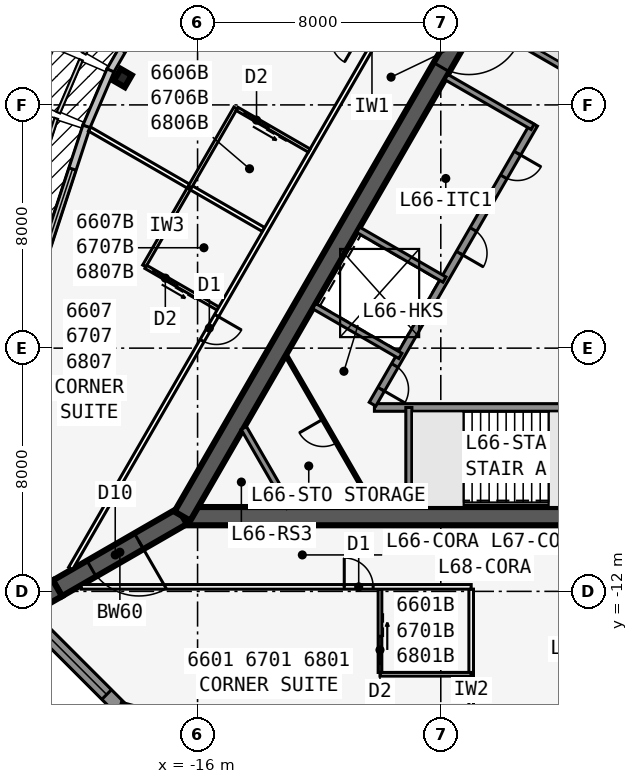
"""IFC4 building model, lengths in metres.
Left out: names, types, materials, properties, quantities, classifications, styles, units other than length and angle.
Written with IfcOpenShell. Run it as: python <this file> out.ifc"""

import sys

from ifc_helpers import new_model, si_unit, direction, frame, frame_2d, origin, origin_2d, place, context, subcontext, project, spatial, polyline, rectangle, i_section, outline, extrude, element, fill, save


model = new_model("IFC4")
c1 = context("Model", 3, precision=1e-05, world=origin(), true_north=direction((0.0, 1.0)))
c2 = subcontext(c1, "Body", "Model", "MODEL_VIEW")
j1 = project(units=[si_unit("LENGTHUNIT", "METRE"), si_unit("PLANEANGLEUNIT", "RADIAN")], contexts=[c1])
p1 = place(None, origin())
s1 = spatial("IfcSite", under=j1, at=p1, CompositionType="ELEMENT")
p2 = place(p1, origin())
s2 = spatial("IfcBuilding", under=s1, at=p2, CompositionType="ELEMENT")
p3 = place(p2, frame((0.0, 0.0, 250.1)))
s3 = spatial("IfcBuildingStorey", under=s2, at=p3, CompositionType="ELEMENT", Elevation=250.1)
p4 = place(p3, frame((-16.5, -9.526, 0.0), z_axis=(0.0, 0.0, 1.0), x_axis=(1.0, 0.0, 0.0)))
e1 = element("IfcWall", 1, at=p4, inside=s3, PredefinedType="SHEAR", context=c2, shape_type="SweptSolid", body=[
    extrude(rectangle(XDim=33.0, YDim=0.6, at=frame_2d((16.5, 0.0))), origin(), (0.0, 0.0, 1.0), 3.6),
])
p5 = place(p4, frame((14.05, 0.0, 0.0)))
e2 = element("IfcOpeningElement", 2, at=p5, cuts=e1, PredefinedType="OPENING", context=c2, shape_type="SweptSolid", body=[
    extrude(rectangle(XDim=1.8, YDim=2.13, at=frame_2d((0.9, 1.065))), frame((0.0, 0.31, 0.0), z_axis=(0.0, -1.0, 0.0), x_axis=(1.0, 0.0, 0.0)), (0.0, 0.0, 1.0), 0.62),
])
p6 = place(p3, frame((-10.183, -5.951, 0.0), z_axis=(0.0, 0.0, 1.0), x_axis=(1.0, 0.0, 0.0)))
e3 = element("IfcWall", 3, at=p6, inside=s3, PredefinedType="SOLIDWALL", context=c2, shape_type="SweptSolid", body=[
    extrude(rectangle(XDim=7.633, YDim=0.25, at=frame_2d((3.816, 0.0))), origin(), (0.0, 0.0, 1.0), 3.435),
])
p7 = place(p3, frame((-9.05, -5.951, 0.0), z_axis=(0.0, 0.0, 1.0), x_axis=(0.0, -1.0, 0.0)))
e4 = element("IfcWall", 4, at=p7, inside=s3, PredefinedType="SOLIDWALL", context=c2, shape_type="SweptSolid", body=[
    extrude(rectangle(XDim=3.275, YDim=0.2, at=frame_2d((1.637, 0.0))), origin(), (0.0, 0.0, 1.0), 3.435),
])
p8 = place(p3, frame((0.0, 19.052, 0.0), z_axis=(0.0, 0.0, 1.0), x_axis=(-0.499999749417, -0.866025548458, 0.0)))
e5 = element("IfcWall", 5, at=p8, inside=s3, PredefinedType="SHEAR", context=c2, shape_type="SweptSolid", body=[
    extrude(rectangle(XDim=33.0, YDim=0.6, at=frame_2d((16.5, 0.0))), origin(), (0.0, 0.0, 1.0), 3.6),
])
p9 = place(p8, frame((14.15, 0.0, 0.0)))
e6 = element("IfcOpeningElement", 6, at=p9, cuts=e5, PredefinedType="OPENING", context=c2, shape_type="SweptSolid", body=[
    extrude(rectangle(XDim=1.8, YDim=2.13, at=frame_2d((0.9, 1.065))), frame((0.0, 0.31, 0.0), z_axis=(0.0, -1.0, 0.0), x_axis=(1.0, 0.0, 0.0)), (0.0, 0.0, 1.0), 0.62),
])
p10 = place(p8, frame((12.6, 0.0, 0.0)))
e7 = element("IfcOpeningElement", 7, at=p10, cuts=e5, PredefinedType="OPENING", context=c2, shape_type="SweptSolid", body=[
    extrude(rectangle(XDim=1.0, YDim=2.13, at=frame_2d((0.5, 1.065))), frame((0.0, 0.31, 0.0), z_axis=(0.0, -1.0, 0.0), x_axis=(1.0, 0.0, 0.0)), (0.0, 0.0, 1.0), 0.62),
])
p11 = place(p3, frame((-4.929, 3.365, 0.0), z_axis=(0.0, 0.0, 1.0), x_axis=(-0.499991433582, -0.866030349552, 0.0)))
e8 = element("IfcWall", 8, at=p11, inside=s3, PredefinedType="SOLIDWALL", context=c2, shape_type="SweptSolid", body=[
    extrude(rectangle(XDim=10.633, YDim=0.25, at=frame_2d((5.316, 0.0))), origin(), (0.0, 0.0, 1.0), 3.435),
])
p12 = place(p11, frame((9.164, 0.0, 0.0)))
e9 = element("IfcOpeningElement", 9, at=p12, cuts=e8, PredefinedType="OPENING", context=c2, shape_type="SweptSolid", body=[
    extrude(rectangle(XDim=0.9, YDim=2.13, at=frame_2d((0.45, 1.065))), frame((0.0, 0.135, 0.0), z_axis=(0.0, -1.0, 0.0), x_axis=(1.0, 0.0, 0.0)), (0.0, 0.0, 1.0), 0.27),
])
p13 = place(p11, frame((1.1, 0.0, 0.0)))
e10 = element("IfcOpeningElement", 10, at=p13, cuts=e8, PredefinedType="OPENING", context=c2, shape_type="SweptSolid", body=[
    extrude(rectangle(XDim=0.9, YDim=2.13, at=frame_2d((0.45, 1.065))), frame((0.0, 0.135, 0.0), z_axis=(0.0, -1.0, 0.0), x_axis=(1.0, 0.0, 0.0)), (0.0, 0.0, 1.0), 0.27),
])
p14 = place(p11, frame((4.0, 0.0, 0.0)))
e11 = element("IfcOpeningElement", 11, at=p14, cuts=e8, PredefinedType="OPENING", context=c2, shape_type="SweptSolid", body=[
    extrude(rectangle(XDim=0.9, YDim=2.13, at=frame_2d((0.45, 1.065))), frame((0.0, 0.135, 0.0), z_axis=(0.0, -1.0, 0.0), x_axis=(1.0, 0.0, 0.0)), (0.0, 0.0, 1.0), 0.27),
])
for number, where, z_axis, x_axis in (
    (12, (-3.879, 5.184, 0.0), (0.0, 0.0, 1.0), (-0.866, 0.5, 0.0)),
    (13, (-4.979, 3.279, 0.0), (0.0, 0.0, 1.0), (-0.866, 0.5, 0.0)),
    (14, (-7.879, -1.744, 0.0), (0.0, 0.0, 1.0), (-0.866, 0.5, 0.0)),
    (15, (-9.329, -4.256, 0.0), (0.0, 0.0, 1.0), (-0.866, 0.5, 0.0)),
):
    element("IfcWall", number, at=place(p3, frame(where, z_axis=z_axis, x_axis=x_axis)), inside=s3, PredefinedType="SOLIDWALL", context=c2, shape_type="SweptSolid", body=[
        extrude(rectangle(XDim=3.275, YDim=0.2, at=frame_2d((1.637, 0.0))), origin(), (0.0, 0.0, 1.0), 3.435),
    ])
p15 = place(p3, frame((-16.5, -9.526, 0.0), z_axis=(0.0, 0.0, 1.0), x_axis=(-0.866031398331, -0.499989616998, 0.0)))
e16 = element("IfcWall", 16, at=p15, inside=s3, PredefinedType="SHEAR", context=c2, shape_type="SweptSolid", body=[
    extrude(rectangle(XDim=4.746, YDim=0.6, at=frame_2d((2.373, 0.0))), origin(), (0.0, 0.0, 1.0), 3.6),
])
p16 = place(p15, frame((1.65, 0.0, 0.0)))
e17 = element("IfcOpeningElement", 17, at=p16, cuts=e16, PredefinedType="OPENING", context=c2, shape_type="SweptSolid", body=[
    extrude(rectangle(XDim=1.8, YDim=2.13, at=frame_2d((0.9, 1.065))), frame((0.0, 0.31, 0.0), z_axis=(0.0, -1.0, 0.0), x_axis=(1.0, 0.0, 0.0)), (0.0, 0.0, 1.0), 0.62),
])
p17 = place(p3, frame((-20.61, -11.899, 0.0), z_axis=(0.0, 0.0, 1.0), x_axis=(-0.866009537788, -0.500027479704, 0.0)))
e18 = element("IfcWall", 18, at=p17, inside=s3, PredefinedType="SHEAR", context=c2, shape_type="SweptSolid", body=[
    extrude(rectangle(XDim=1.155, YDim=0.6, at=frame_2d((0.577, 0.0))), origin(), (0.0, 0.0, 1.0), 3.6),
])
p18 = place(p3, frame((-18.461, 4.885, 0.0), z_axis=(0.0, 0.0, 1.0), x_axis=(-0.866025403784, 0.5, 0.0)))
e19 = element("IfcColumn", 19, at=p18, inside=s3, PredefinedType="COLUMN", context=c2, shape_type="SweptSolid", body=[
    extrude(i_section(OverallWidth=0.419, OverallDepth=0.455, WebThickness=0.042, FlangeThickness=0.068, at=origin_2d()), origin(), (0.0, 0.0, 1.0), 3.6),
])
p19 = place(p3, frame((-13.873, 13.783, 0.0), z_axis=(0.0, 0.0, 1.0), x_axis=(-0.499993662806, -0.866029062534, 0.0)))
e20 = element("IfcWall", 20, at=p19, inside=s3, PredefinedType="STANDARD", context=c2, shape_type="SweptSolid", body=[
    extrude(rectangle(XDim=10.0, YDim=0.25, at=frame_2d((5.0, 0.0))), origin(), (0.0, 0.0, 1.0), 3.435),
])
p20 = place(p19, frame((0.775, 0.0, 0.45)))
e21 = element("IfcOpeningElement", 21, at=p20, cuts=e20, PredefinedType="OPENING", context=c2, shape_type="SweptSolid", body=[
    extrude(rectangle(XDim=3.6, YDim=2.6, at=frame_2d((1.8, 1.3))), frame((0.0, 0.135, 0.0), z_axis=(0.0, -1.0, 0.0), x_axis=(1.0, 0.0, 0.0)), (0.0, 0.0, 1.0), 0.27),
])
p21 = place(p19, frame((5.625, 0.0, 0.45)))
e22 = element("IfcOpeningElement", 22, at=p21, cuts=e20, PredefinedType="OPENING", context=c2, shape_type="SweptSolid", body=[
    extrude(rectangle(XDim=3.6, YDim=2.6, at=frame_2d((1.8, 1.3))), frame((0.0, 0.135, 0.0), z_axis=(0.0, -1.0, 0.0), x_axis=(1.0, 0.0, 0.0)), (0.0, 0.0, 1.0), 0.27),
])
p22 = place(p3, frame((-18.866, 5.136, 0.0), z_axis=(0.0, 0.0, 1.0), x_axis=(-0.393290226175, -0.91941437774, 0.0)))
e23 = element("IfcWall", 23, at=p22, inside=s3, PredefinedType="STANDARD", context=c2, shape_type="SweptSolid", body=[
    extrude(rectangle(XDim=2.014, YDim=0.25, at=frame_2d((1.007, 0.0))), origin(), (0.0, 0.0, 1.0), 3.435),
])
p23 = place(p3, frame((-19.654, 3.294, 0.0), z_axis=(0.0, 0.0, 1.0), x_axis=(-0.311328857048, -0.95030223759, 0.0)))
e24 = element("IfcWall", 24, at=p23, inside=s3, PredefinedType="STANDARD", context=c2, shape_type="SweptSolid", body=[
    extrude(rectangle(XDim=7.153, YDim=0.25, at=frame_2d((3.576, 0.0))), origin(), (0.0, 0.0, 1.0), 3.435),
])
p24 = place(p23, frame((1.476, 0.0, 0.45)))
e25 = element("IfcOpeningElement", 25, at=p24, cuts=e24, PredefinedType="OPENING", context=c2, shape_type="SweptSolid", body=[
    extrude(rectangle(XDim=4.2, YDim=2.6, at=frame_2d((2.1, 1.3))), frame((0.0, 0.135, 0.0), z_axis=(0.0, -1.0, 0.0), x_axis=(1.0, 0.0, 0.0)), (0.0, 0.0, 1.0), 0.27),
])
p25 = place(p3, frame((-21.841, -12.542, 0.0), z_axis=(0.0, 0.0, 1.0), x_axis=(0.707081252484, -0.707132308968, 0.0)))
e26 = element("IfcWall", 26, at=p25, inside=s3, PredefinedType="SOLIDWALL", context=c2, shape_type="SweptSolid", body=[
    extrude(outline(polyline([(4.782, 0.225), (0.431, 0.225), (0.406, 0.132), (0.059, 0.225), (0.0, 0.225), (0.0, -0.225), (4.782, -0.225), (4.782, 0.225)])), origin(), (0.0, 0.0, 1.0), 3.435),
])
p26 = place(p25, frame((1.031, 0.0, 0.45)))
e27 = element("IfcOpeningElement", 27, at=p26, cuts=e26, PredefinedType="OPENING", context=c2, shape_type="SweptSolid", body=[
    extrude(rectangle(XDim=3.0, YDim=2.6, at=frame_2d((1.5, 1.3))), frame((0.0, 0.235, 0.0), z_axis=(0.0, -1.0, 0.0), x_axis=(1.0, 0.0, 0.0)), (0.0, 0.0, 1.0), 0.47),
])
p27 = place(p3, frame((-18.561, -15.865, 0.0), z_axis=(0.0, 0.0, 1.0), x_axis=(0.965913862671, -0.258863689806, 0.0)))
e28 = element("IfcWall", 28, at=p27, inside=s3, PredefinedType="SOLIDWALL", context=c2, shape_type="SweptSolid", body=[
    extrude(rectangle(XDim=4.782, YDim=0.45, at=frame_2d((2.391, 0.0))), origin(), (0.0, 0.0, 1.0), 3.435),
])
p28 = place(p27, frame((0.591, 0.0, 0.45)))
e29 = element("IfcOpeningElement", 29, at=p28, cuts=e28, PredefinedType="OPENING", context=c2, shape_type="SweptSolid", body=[
    extrude(rectangle(XDim=3.6, YDim=2.6, at=frame_2d((1.8, 1.3))), frame((0.0, 0.235, 0.0), z_axis=(0.0, -1.0, 0.0), x_axis=(1.0, 0.0, 0.0)), (0.0, 0.0, 1.0), 0.47),
])
p29 = place(p3, frame((-19.827, -11.851, 0.0), z_axis=(0.0, 0.0, 1.0), x_axis=(1.0, 0.0, 0.0)))
e30 = element("IfcWall", 30, at=p29, inside=s3, PredefinedType="PARTITIONING", context=c2, shape_type="SweptSolid", body=[
    extrude(rectangle(XDim=12.827, YDim=0.15, at=frame_2d((6.414, 0.0))), origin(), (0.0, 0.0, 1.0), 3.435),
])
p30 = place(p29, frame((8.652, 0.0, 0.0)))
e31 = element("IfcOpeningElement", 31, at=p30, cuts=e30, PredefinedType="OPENING", context=c2, shape_type="SweptSolid", body=[
    extrude(rectangle(XDim=0.95, YDim=2.13, at=frame_2d((0.475, 1.065))), frame((0.0, 0.085, 0.0), z_axis=(0.0, -1.0, 0.0), x_axis=(1.0, 0.0, 0.0)), (0.0, 0.0, 1.0), 0.17),
])
p31 = place(p3, frame((-7.0, -11.926, 0.0), z_axis=(0.0, 0.0, 1.0), x_axis=(0.0, -1.0, 0.0)))
e32 = element("IfcWall", 32, at=p31, inside=s3, PredefinedType="PARTITIONING", context=c2, shape_type="SweptSolid", body=[
    extrude(rectangle(XDim=6.609, YDim=0.15, at=frame_2d((3.304, 0.0))), origin(), (0.0, 0.0, 1.0), 2.678),
])
p32 = place(p3, frame((-10.0, -14.726, 0.0), z_axis=(0.0, 0.0, 1.0), x_axis=(1.0, 0.0, 0.0)))
e33 = element("IfcWall", 33, at=p32, inside=s3, PredefinedType="PLUMBINGWALL", context=c2, shape_type="SweptSolid", body=[
    extrude(rectangle(XDim=3.0, YDim=0.12, at=frame_2d((1.5, 0.0))), origin(), (0.0, 0.0, 1.0), 3.435),
])
p33 = place(p3, frame((-10.0, -11.926, 0.0), z_axis=(0.0, 0.0, 1.0), x_axis=(0.0, -1.0, 0.0)))
e34 = element("IfcWall", 34, at=p33, inside=s3, PredefinedType="PLUMBINGWALL", context=c2, shape_type="SweptSolid", body=[
    extrude(rectangle(XDim=2.74, YDim=0.12, at=frame_2d((1.37, 0.0))), origin(), (0.0, 0.0, 1.0), 3.435),
])
p34 = place(p33, frame((1.55, 0.0, 0.0)))
e35 = element("IfcOpeningElement", 35, at=p34, cuts=e34, PredefinedType="OPENING", context=c2, shape_type="SweptSolid", body=[
    extrude(rectangle(XDim=0.9, YDim=2.13, at=frame_2d((0.45, 1.065))), frame((0.0, 0.07, 0.0), z_axis=(0.0, -1.0, 0.0), x_axis=(1.0, 0.0, 0.0)), (0.0, 0.0, 1.0), 0.14),
])
p35 = place(p3, frame((-0.35, 23.096, 0.0), z_axis=(0.0, 0.0, 1.0), x_axis=(-0.499998875317, -0.866026053119, 0.0)))
e36 = element("IfcWall", 36, at=p35, inside=s3, PredefinedType="PARTITIONING", context=c2, shape_type="SweptSolid", body=[
    extrude(rectangle(XDim=39.654, YDim=0.15, at=frame_2d((19.827, 0.0))), origin(), (0.0, 0.0, 1.0), 3.435),
])
p36 = place(p35, frame((8.652, 0.0, 0.0)))
e37 = element("IfcOpeningElement", 37, at=p36, cuts=e36, PredefinedType="OPENING", context=c2, shape_type="SweptSolid", body=[
    extrude(rectangle(XDim=0.95, YDim=2.13, at=frame_2d((0.475, 1.065))), frame((0.0, 0.085, 0.0), z_axis=(0.0, -1.0, 0.0), x_axis=(1.0, 0.0, 0.0)), (0.0, 0.0, 1.0), 0.17),
])
p37 = place(p35, frame((15.852, 0.0, 0.0)))
e38 = element("IfcOpeningElement", 38, at=p37, cuts=e36, PredefinedType="OPENING", context=c2, shape_type="SweptSolid", body=[
    extrude(rectangle(XDim=0.95, YDim=2.13, at=frame_2d((0.475, 1.065))), frame((0.0, 0.085, 0.0), z_axis=(0.0, -1.0, 0.0), x_axis=(1.0, 0.0, 0.0)), (0.0, 0.0, 1.0), 0.17),
])
p38 = place(p35, frame((30.052, 0.0, 0.0)))
e39 = element("IfcOpeningElement", 39, at=p38, cuts=e36, PredefinedType="OPENING", context=c2, shape_type="SweptSolid", body=[
    extrude(rectangle(XDim=0.95, YDim=2.13, at=frame_2d((0.475, 1.065))), frame((0.0, 0.085, 0.0), z_axis=(0.0, -1.0, 0.0), x_axis=(1.0, 0.0, 0.0)), (0.0, 0.0, 1.0), 0.17),
])
p39 = place(p3, frame((-13.829, -0.099, 0.0), z_axis=(0.0, 0.0, 1.0), x_axis=(-0.866022562216, 0.500004921708, 0.0)))
e40 = element("IfcWall", 40, at=p39, inside=s3, PredefinedType="PARTITIONING", context=c2, shape_type="SweptSolid", body=[
    extrude(rectangle(XDim=6.609, YDim=0.15, at=frame_2d((3.304, 0.0))), origin(), (0.0, 0.0, 1.0), 2.678),
])
p40 = place(p3, frame((-14.753, 3.899, 0.0), z_axis=(0.0, 0.0, 1.0), x_axis=(-0.50002537861, -0.866010750942, 0.0)))
e41 = element("IfcWall", 41, at=p40, inside=s3, PredefinedType="PLUMBINGWALL", context=c2, shape_type="SweptSolid", body=[
    extrude(rectangle(XDim=3.0, YDim=0.12, at=frame_2d((1.5, 0.0))), origin(), (0.0, 0.0, 1.0), 3.435),
])
p41 = place(p3, frame((-12.329, 2.499, 0.0), z_axis=(0.0, 0.0, 1.0), x_axis=(-0.866035715982, 0.499982138324, 0.0)))
e42 = element("IfcWall", 42, at=p41, inside=s3, PredefinedType="PLUMBINGWALL", context=c2, shape_type="SweptSolid", body=[
    extrude(rectangle(XDim=2.74, YDim=0.12, at=frame_2d((1.37, 0.0))), origin(), (0.0, 0.0, 1.0), 3.435),
])
p42 = place(p41, frame((1.55, 0.0, 0.0)))
e43 = element("IfcOpeningElement", 43, at=p42, cuts=e42, PredefinedType="OPENING", context=c2, shape_type="SweptSolid", body=[
    extrude(rectangle(XDim=0.9, YDim=2.13, at=frame_2d((0.45, 1.065))), frame((0.0, 0.07, 0.0), z_axis=(0.0, -1.0, 0.0), x_axis=(1.0, 0.0, 0.0)), (0.0, 0.0, 1.0), 0.14),
])
p43 = place(p3, frame((-16.253, 1.301, 0.0), z_axis=(0.0, 0.0, 1.0), x_axis=(-0.499990139034, -0.866031096941, 0.0)))
e44 = element("IfcWall", 44, at=p43, inside=s3, PredefinedType="PLUMBINGWALL", context=c2, shape_type="SweptSolid", body=[
    extrude(rectangle(XDim=3.0, YDim=0.12, at=frame_2d((1.5, 0.0))), origin(), (0.0, 0.0, 1.0), 3.435),
])
p44 = place(p3, frame((-15.329, -2.697, 0.0), z_axis=(0.0, 0.0, 1.0), x_axis=(-0.866035715982, 0.499982138324, 0.0)))
e45 = element("IfcWall", 45, at=p44, inside=s3, PredefinedType="PLUMBINGWALL", context=c2, shape_type="SweptSolid", body=[
    extrude(rectangle(XDim=2.74, YDim=0.12, at=frame_2d((1.37, 0.0))), origin(), (0.0, 0.0, 1.0), 3.435),
])
p45 = place(p44, frame((1.55, 0.0, 0.0)))
e46 = element("IfcOpeningElement", 46, at=p45, cuts=e45, PredefinedType="OPENING", context=c2, shape_type="SweptSolid", body=[
    extrude(rectangle(XDim=0.9, YDim=2.13, at=frame_2d((0.45, 1.065))), frame((0.0, 0.07, 0.0), z_axis=(0.0, -1.0, 0.0), x_axis=(1.0, 0.0, 0.0)), (0.0, 0.0, 1.0), 0.14),
])
p46 = place(p3, frame((-12.978, -9.226, 0.0), z_axis=(0.0, 0.0, 1.0), x_axis=(-0.499952404951, 0.866052881055, 0.0)))
e47 = element("IfcWall", 47, at=p46, inside=s3, PredefinedType="SOLIDWALL", context=c2, shape_type="SweptSolid", body=[
    extrude(rectangle(XDim=3.002, YDim=0.2, at=frame_2d((1.501, 0.0))), origin(), (0.0, 0.0, 1.0), 3.435),
])
p47 = place(p3, frame((-10.207, -9.226, 0.0), z_axis=(0.0, 0.0, 1.0), x_axis=(-0.500027479704, 0.866009537788, 0.0)))
e48 = element("IfcWall", 48, at=p47, inside=s3, PredefinedType="PARTITIONING", context=c2, shape_type="SweptSolid", body=[
    extrude(rectangle(XDim=5.774, YDim=0.1, at=frame_2d((2.887, 0.0))), origin(), (0.0, 0.0, 1.0), 3.435),
])
p48 = place(p47, frame((2.437, 0.0, 0.0)))
e49 = element("IfcOpeningElement", 49, at=p48, cuts=e48, PredefinedType="OPENING", context=c2, shape_type="SweptSolid", body=[
    extrude(rectangle(XDim=0.9, YDim=2.13, at=frame_2d((0.45, 1.065))), frame((0.0, 0.06, 0.0), z_axis=(0.0, -1.0, 0.0), x_axis=(1.0, 0.0, 0.0)), (0.0, 0.0, 1.0), 0.12),
])
p49 = place(p3, frame((-7.247, -7.576, 0.0), z_axis=(0.0, 0.0, 1.0), x_axis=(1.0, 0.0, 0.0)))
e50 = element("IfcWall", 50, at=p49, inside=s3, PredefinedType="SOLIDWALL", context=c2, shape_type="SweptSolid", body=[
    extrude(rectangle(XDim=2.794, YDim=0.1, at=frame_2d((1.397, 0.0))), origin(), (0.0, 0.0, 1.0), 3.6),
])
p50 = place(p24, origin())
e51 = element("IfcWindow", 51, at=p50, inside=s3, PartitioningType="SINGLE_PANEL", PredefinedType="WINDOW", context=c2, shape_type="SweptSolid", body=[
    extrude(rectangle(XDim=4.2, YDim=2.6, at=frame_2d((2.1, 1.3))), frame((0.0, 0.03, 0.0), z_axis=(0.0, -1.0, 0.0), x_axis=(1.0, 0.0, 0.0)), (0.0, 0.0, 1.0), 0.06),
])
fill(e25, e51)
p51 = place(p26, origin())
e52 = element("IfcWindow", 52, at=p51, inside=s3, PartitioningType="SINGLE_PANEL", PredefinedType="WINDOW", context=c2, shape_type="SweptSolid", body=[
    extrude(rectangle(XDim=3.0, YDim=2.6, at=frame_2d((1.5, 1.3))), frame((0.0, 0.03, 0.0), z_axis=(0.0, -1.0, 0.0), x_axis=(1.0, 0.0, 0.0)), (0.0, 0.0, 1.0), 0.06),
])
fill(e27, e52)
p52 = place(p34, origin())
e53 = element("IfcDoor", 53, at=p52, inside=s3, OperationType="SLIDING_TO_LEFT", PredefinedType="DOOR", context=c2, shape_type="SweptSolid", body=[
    extrude(rectangle(XDim=0.9, YDim=2.13, at=frame_2d((0.45, 1.065))), frame((0.0, 0.025, 0.0), z_axis=(0.0, -1.0, 0.0), x_axis=(1.0, 0.0, 0.0)), (0.0, 0.0, 1.0), 0.05),
])
fill(e35, e53)
p53 = place(p30, origin())
e54 = element("IfcDoor", 54, at=p53, inside=s3, OperationType="SINGLE_SWING_LEFT", PredefinedType="DOOR", context=c2, shape_type="SweptSolid", body=[
    extrude(rectangle(XDim=0.95, YDim=2.13, at=frame_2d((0.475, 1.065))), frame((0.0, 0.025, 0.0), z_axis=(0.0, -1.0, 0.0), x_axis=(1.0, 0.0, 0.0)), (0.0, 0.0, 1.0), 0.05),
])
fill(e31, e54)
p54 = place(p42, origin())
e55 = element("IfcDoor", 55, at=p54, inside=s3, OperationType="SLIDING_TO_LEFT", PredefinedType="DOOR", context=c2, shape_type="SweptSolid", body=[
    extrude(rectangle(XDim=0.9, YDim=2.13, at=frame_2d((0.45, 1.065))), frame((0.0, 0.025, 0.0), z_axis=(0.0, -1.0, 0.0), x_axis=(1.0, 0.0, 0.0)), (0.0, 0.0, 1.0), 0.05),
])
fill(e43, e55)
p55 = place(p45, origin())
e56 = element("IfcDoor", 56, at=p55, inside=s3, OperationType="SLIDING_TO_LEFT", PredefinedType="DOOR", context=c2, shape_type="SweptSolid", body=[
    extrude(rectangle(XDim=0.9, YDim=2.13, at=frame_2d((0.45, 1.065))), frame((0.0, 0.025, 0.0), z_axis=(0.0, -1.0, 0.0), x_axis=(1.0, 0.0, 0.0)), (0.0, 0.0, 1.0), 0.05),
])
fill(e46, e56)
p56 = place(p38, origin())
e57 = element("IfcDoor", 57, at=p56, inside=s3, OperationType="SINGLE_SWING_LEFT", PredefinedType="DOOR", context=c2, shape_type="SweptSolid", body=[
    extrude(rectangle(XDim=0.95, YDim=2.13, at=frame_2d((0.475, 1.065))), frame((0.0, 0.025, 0.0), z_axis=(0.0, -1.0, 0.0), x_axis=(1.0, 0.0, 0.0)), (0.0, 0.0, 1.0), 0.05),
])
fill(e39, e57)
p57 = place(p9, origin())
e58 = element("IfcDoor", 58, at=p57, inside=s3, OperationType="DOUBLE_DOOR_SINGLE_SWING", PredefinedType="DOOR", context=c2, shape_type="SweptSolid", body=[
    extrude(rectangle(XDim=1.8, YDim=2.13, at=frame_2d((0.9, 1.065))), frame((0.0, 0.025, 0.0), z_axis=(0.0, -1.0, 0.0), x_axis=(1.0, 0.0, 0.0)), (0.0, 0.0, 1.0), 0.05),
])
fill(e6, e58)
p58 = place(p16, origin())
e59 = element("IfcDoor", 59, at=p58, inside=s3, OperationType="DOUBLE_DOOR_DOUBLE_SWING", PredefinedType="DOOR", context=c2, shape_type="SweptSolid", body=[
    extrude(rectangle(XDim=1.8, YDim=2.13, at=frame_2d((0.9, 1.065))), frame((0.0, 0.025, 0.0), z_axis=(0.0, -1.0, 0.0), x_axis=(1.0, 0.0, 0.0)), (0.0, 0.0, 1.0), 0.05),
])
fill(e17, e59)
p59 = place(p48, origin())
e60 = element("IfcDoor", 60, at=p59, inside=s3, OperationType="SINGLE_SWING_RIGHT", PredefinedType="DOOR", context=c2, shape_type="SweptSolid", body=[
    extrude(rectangle(XDim=0.9, YDim=2.13, at=frame_2d((0.45, 1.065))), frame((0.0, 0.025, 0.0), z_axis=(0.0, -1.0, 0.0), x_axis=(1.0, 0.0, 0.0)), (0.0, 0.0, 1.0), 0.05),
])
fill(e49, e60)
p60 = place(p12, origin())
e61 = element("IfcDoor", 61, at=p60, inside=s3, OperationType="SINGLE_SWING_RIGHT", PredefinedType="DOOR", context=c2, shape_type="SweptSolid", body=[
    extrude(rectangle(XDim=0.9, YDim=2.13, at=frame_2d((0.45, 1.065))), frame((0.0, 0.025, 0.0), z_axis=(0.0, -1.0, 0.0), x_axis=(1.0, 0.0, 0.0)), (0.0, 0.0, 1.0), 0.05),
])
fill(e9, e61)
p61 = place(p13, origin())
e62 = element("IfcDoor", 62, at=p61, inside=s3, OperationType="SINGLE_SWING_LEFT", PredefinedType="DOOR", context=c2, shape_type="SweptSolid", body=[
    extrude(rectangle(XDim=0.9, YDim=2.13, at=frame_2d((0.45, 1.065))), frame((0.0, 0.025, 0.0), z_axis=(0.0, -1.0, 0.0), x_axis=(1.0, 0.0, 0.0)), (0.0, 0.0, 1.0), 0.05),
])
fill(e10, e62)
p62 = place(p14, origin())
e63 = element("IfcDoor", 63, at=p62, inside=s3, OperationType="SINGLE_SWING_RIGHT", PredefinedType="DOOR", context=c2, shape_type="SweptSolid", body=[
    extrude(rectangle(XDim=0.9, YDim=2.13, at=frame_2d((0.45, 1.065))), frame((0.0, 0.025, 0.0), z_axis=(0.0, -1.0, 0.0), x_axis=(1.0, 0.0, 0.0)), (0.0, 0.0, 1.0), 0.05),
])
fill(e11, e63)
save(model, sys.argv[1])
